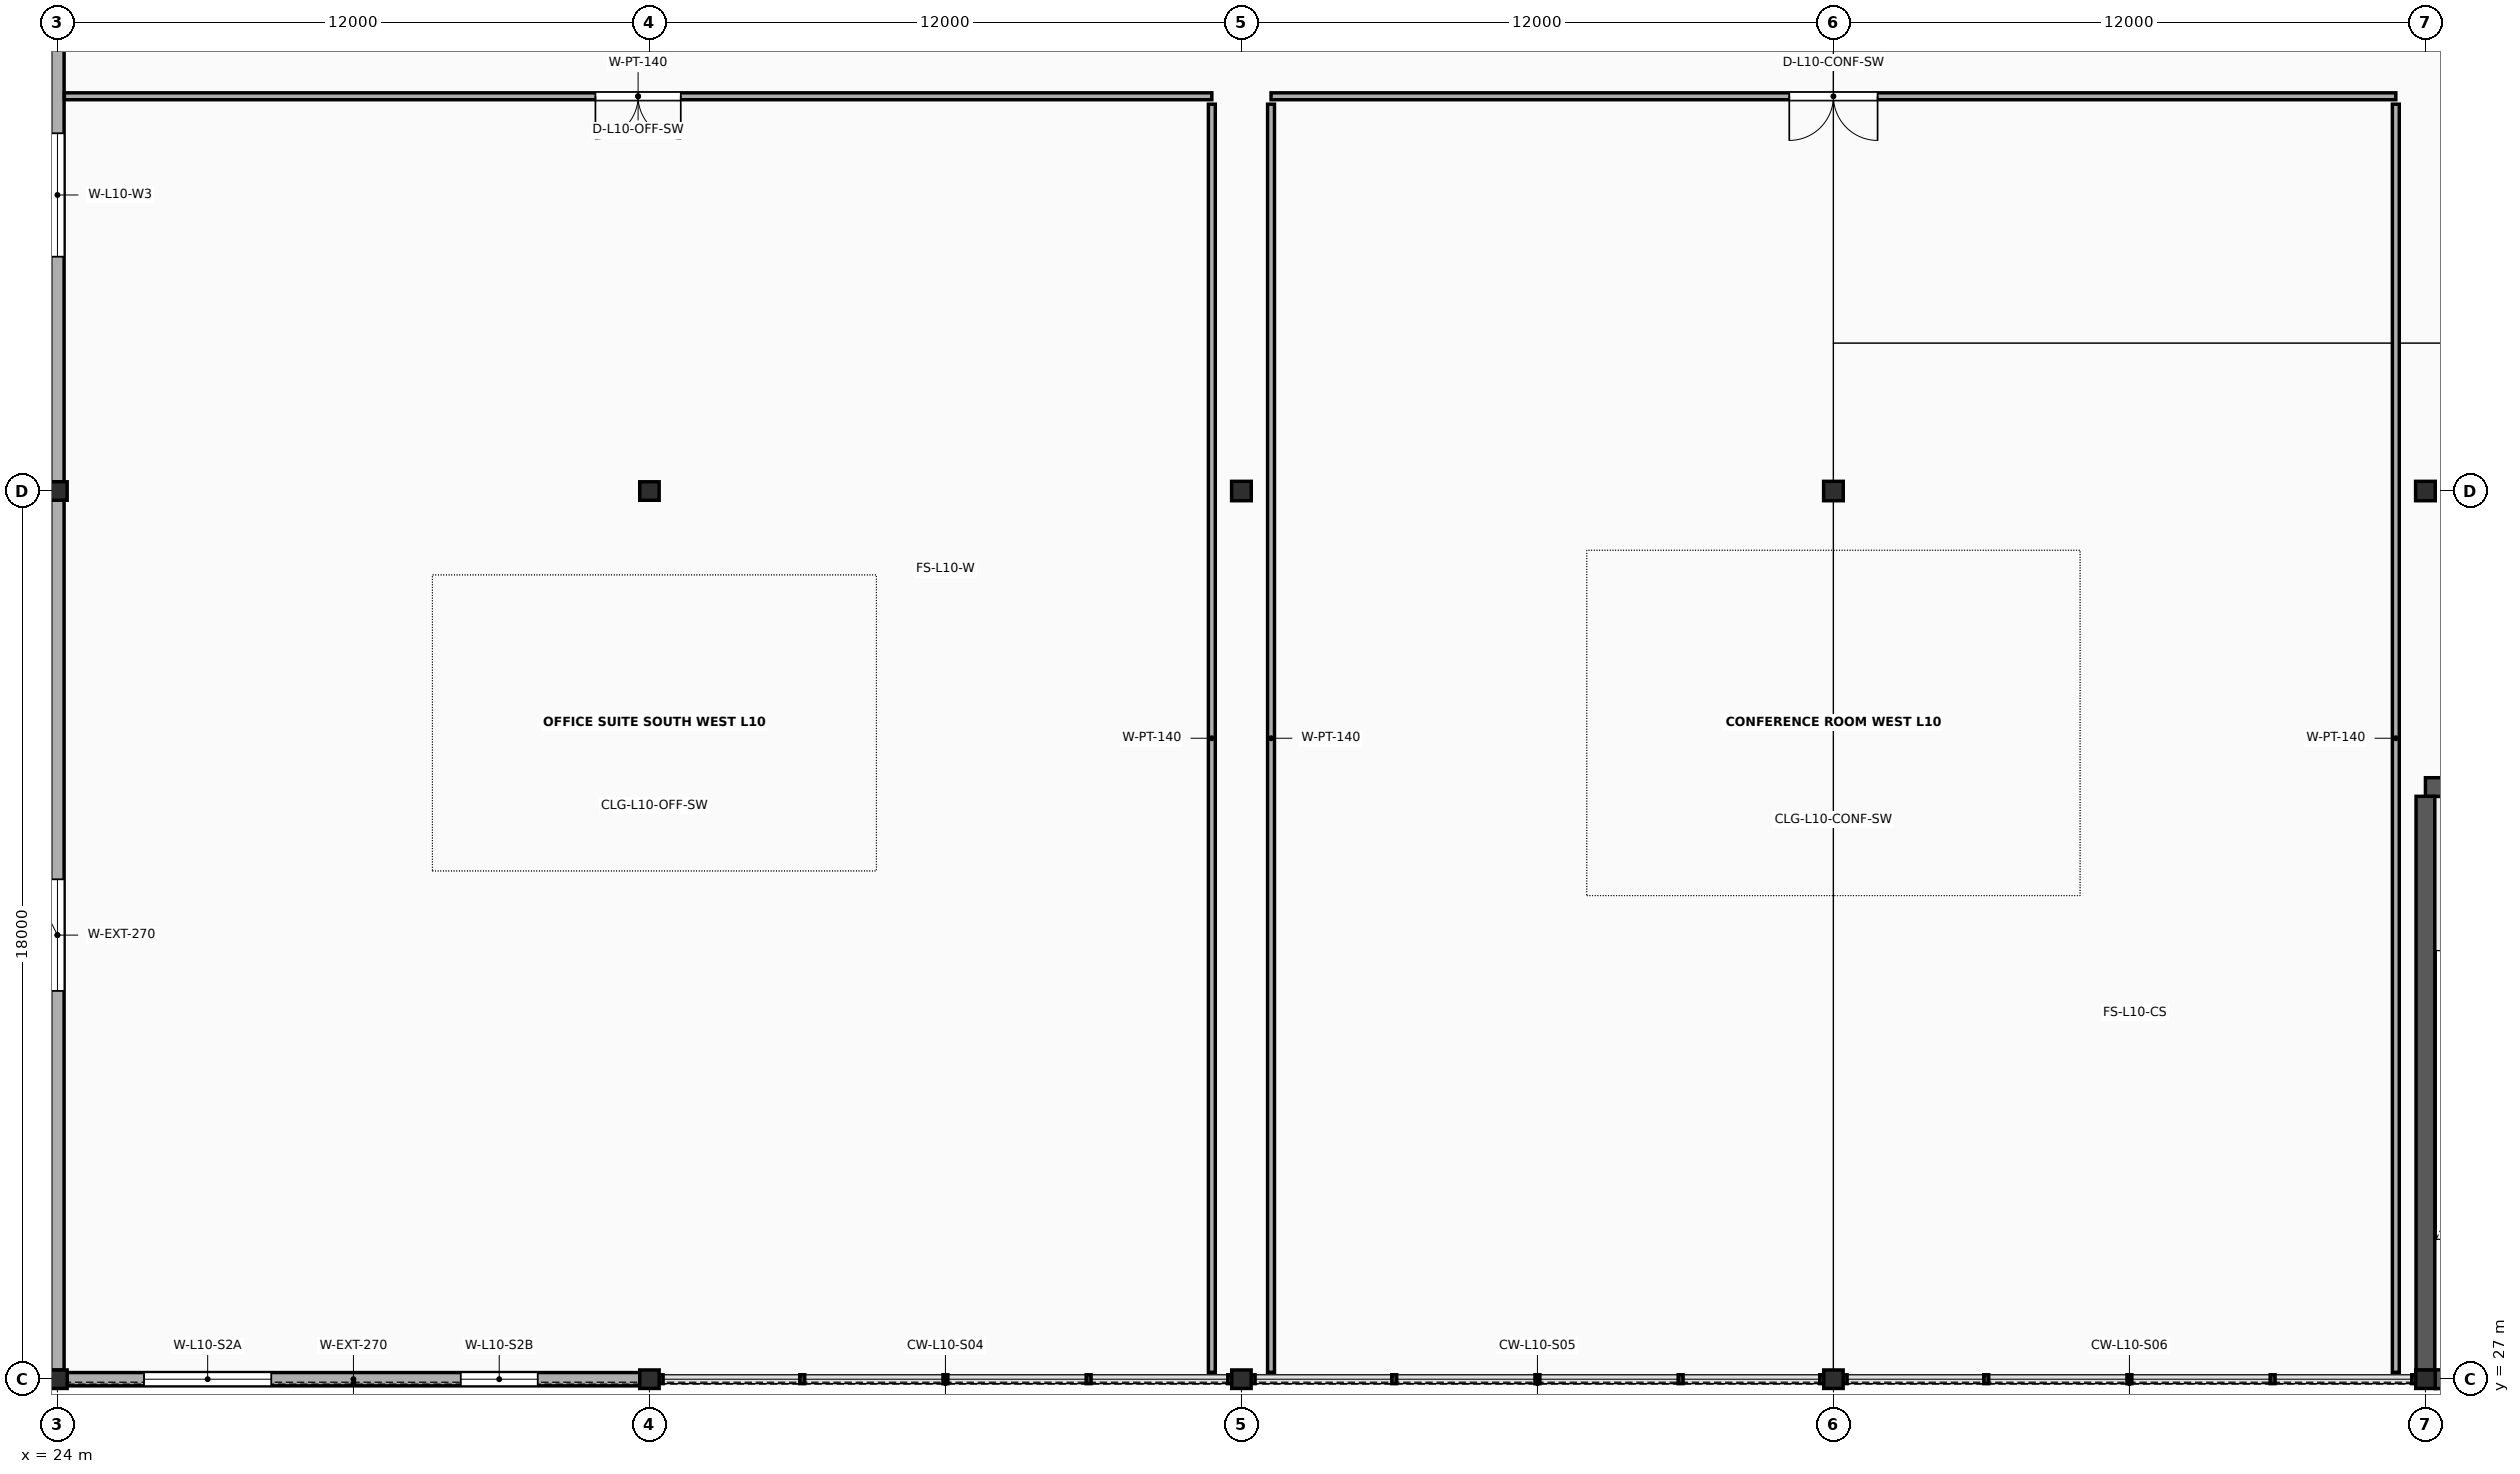
"""IFC4 building model, lengths in metres.
Left out: names, types, materials, properties, quantities, classifications, styles, units other than length and angle.
Written with IfcOpenShell. Run it as: python <this file> out.ifc"""

import sys

from ifc_helpers import new_model, si_unit, direction, frame, frame_2d, origin, origin_2d, place, context, subcontext, project, spatial, rectangle, i_section, extrude, element, fill, save


model = new_model("IFC4")
c1 = context("Model", 3, precision=1e-05, world=origin(), true_north=direction((0.0, 1.0)))
c2 = subcontext(c1, "Body", "Model", "MODEL_VIEW")
j1 = project(units=[si_unit("LENGTHUNIT", "METRE"), si_unit("PLANEANGLEUNIT", "RADIAN")], contexts=[c1])
p1 = place(None, origin())
s1 = spatial("IfcSite", under=j1, at=p1, CompositionType="ELEMENT")
p2 = place(p1, origin())
s2 = spatial("IfcBuilding", under=s1, at=p2, CompositionType="ELEMENT")
p3 = place(p2, frame((0.0, 0.0, 41.6)))
s3 = spatial("IfcBuildingStorey", under=s2, at=p3, CompositionType="ELEMENT", Elevation=41.6)
for number, where, z_axis, x_axis in (
    (1, (24.0, 27.0, 0.0), (0.0, 0.0, 1.0), (1.0, 0.0, 0.0)),
    (2, (24.0, 45.0, 0.0), (0.0, 0.0, 1.0), (1.0, 0.0, 0.0)),
    (3, (36.0, 27.0, 0.0), (0.0, 0.0, 1.0), (1.0, 0.0, 0.0)),
    (4, (36.0, 45.0, 0.0), (0.0, 0.0, 1.0), (1.0, 0.0, 0.0)),
    (5, (48.0, 27.0, 0.0), (0.0, 0.0, 1.0), (1.0, 0.0, 0.0)),
):
    element("IfcColumn", number, at=place(p3, frame(where, z_axis=z_axis, x_axis=x_axis)), inside=s3, PredefinedType="COLUMN", context=c2, shape_type="SweptSolid", body=[
        extrude(i_section(OverallWidth=0.394, OverallDepth=0.375, WebThickness=0.017, FlangeThickness=0.028, FilletRadius=0.018, at=origin_2d()), origin(), (0.0, 0.0, 1.0), 4.0),
    ])
p4 = place(p3, frame((48.0, 45.0, 0.0), z_axis=(0.0, 0.0, 1.0), x_axis=(1.0, 0.0, 0.0)))
e6 = element("IfcColumn", 6, at=p4, inside=s3, PredefinedType="COLUMN", context=c2, shape_type="SweptSolid", body=[
    extrude(i_section(OverallWidth=0.399, OverallDepth=0.393, WebThickness=0.023, FlangeThickness=0.037, FilletRadius=0.018, at=origin_2d()), origin(), (0.0, 0.0, 1.0), 4.0),
])
p5 = place(p3, frame((60.0, 27.0, 0.0), z_axis=(0.0, 0.0, 1.0), x_axis=(1.0, 0.0, 0.0)))
e7 = element("IfcColumn", 7, at=p5, inside=s3, PredefinedType="COLUMN", context=c2, shape_type="SweptSolid", body=[
    extrude(i_section(OverallWidth=0.394, OverallDepth=0.375, WebThickness=0.017, FlangeThickness=0.028, FilletRadius=0.018, at=origin_2d()), origin(), (0.0, 0.0, 1.0), 4.0),
])
p6 = place(p3, frame((60.0, 45.0, 0.0), z_axis=(0.0, 0.0, 1.0), x_axis=(1.0, 0.0, 0.0)))
e8 = element("IfcColumn", 8, at=p6, inside=s3, PredefinedType="COLUMN", context=c2, shape_type="SweptSolid", body=[
    extrude(i_section(OverallWidth=0.399, OverallDepth=0.393, WebThickness=0.023, FlangeThickness=0.037, FilletRadius=0.018, at=origin_2d()), origin(), (0.0, 0.0, 1.0), 4.0),
])
p7 = place(p3, frame((72.0, 27.0, 0.0), z_axis=(0.0, 0.0, 1.0), x_axis=(1.0, 0.0, 0.0)))
e9 = element("IfcColumn", 9, at=p7, inside=s3, PredefinedType="COLUMN", context=c2, shape_type="SweptSolid", body=[
    extrude(i_section(OverallWidth=0.394, OverallDepth=0.375, WebThickness=0.017, FlangeThickness=0.028, FilletRadius=0.018, at=origin_2d()), origin(), (0.0, 0.0, 1.0), 4.0),
])
p8 = place(p3, frame((72.0, 45.0, 0.0), z_axis=(0.0, 0.0, 1.0), x_axis=(1.0, 0.0, 0.0)))
e10 = element("IfcColumn", 10, at=p8, inside=s3, PredefinedType="COLUMN", context=c2, shape_type="SweptSolid", body=[
    extrude(i_section(OverallWidth=0.399, OverallDepth=0.393, WebThickness=0.023, FlangeThickness=0.037, FilletRadius=0.018, at=origin_2d()), origin(), (0.0, 0.0, 1.0), 4.0),
])
p9 = place(p3, frame((72.194, 27.0, 0.0), z_axis=(0.0, 0.0, 1.0), x_axis=(1.0, 0.0, 0.0)))
e11 = element("IfcWall", 11, at=p9, inside=s3, PredefinedType="SHEAR", context=c2, shape_type="SweptSolid", body=[
    extrude(rectangle(XDim=11.612, YDim=0.38, at=frame_2d((5.806, 0.0))), origin(), (0.0, 0.0, 1.0), 3.828),
])
p10 = place(p3, frame((72.0, 39.0, 0.0), z_axis=(0.0, 0.0, 1.0), x_axis=(1.0, 0.0, 0.0)))
e12 = element("IfcWall", 12, at=p10, inside=s3, PredefinedType="SHEAR", context=c2, shape_type="SweptSolid", body=[
    extrude(rectangle(XDim=12.0, YDim=0.38, at=frame_2d((6.0, 0.0))), origin(), (0.0, 0.0, 1.0), 3.828),
])
p11 = place(p10, frame((7.45, 0.0, 0.0)))
e13 = element("IfcOpeningElement", 13, at=p11, cuts=e12, PredefinedType="OPENING", context=c2, shape_type="SweptSolid", body=[
    extrude(rectangle(XDim=1.5, YDim=2.25, at=frame_2d((0.75, 1.125))), frame((0.0, 0.205, 0.0), z_axis=(0.0, -1.0, 0.0), x_axis=(1.0, 0.0, 0.0)), (0.0, 0.0, 1.0), 0.41),
])
p12 = place(p3, frame((72.0, 27.185, 0.0), z_axis=(0.0, 0.0, 1.0), x_axis=(0.0, 1.0, 0.0)))
e14 = element("IfcWall", 14, at=p12, inside=s3, PredefinedType="SHEAR", context=c2, shape_type="SweptSolid", body=[
    extrude(rectangle(XDim=11.628, YDim=0.38, at=frame_2d((5.814, 0.0))), origin(), (0.0, 0.0, 1.0), 3.828),
])
p13 = place(p3, frame((24.195, 27.0, 0.0), z_axis=(0.0, 0.0, 1.0), x_axis=(1.0, 0.0, 0.0)))
e15 = element("IfcWall", 15, at=p13, inside=s3, PredefinedType="SOLIDWALL", context=c2, shape_type="SweptSolid", body=[
    extrude(rectangle(XDim=11.61, YDim=0.27, at=frame_2d((5.805, 0.0))), origin(), (0.0, 0.0, 1.0), 3.281),
])
p14 = place(p13, frame((1.56, 0.0, 0.78)))
e16 = element("IfcOpeningElement", 16, at=p14, cuts=e15, PredefinedType="OPENING", context=c2, shape_type="SweptSolid", body=[
    extrude(rectangle(XDim=2.58, YDim=1.74, at=frame_2d((1.29, 0.87))), frame((0.0, 0.15, 0.0), z_axis=(0.0, -1.0, 0.0), x_axis=(1.0, 0.0, 0.0)), (0.0, 0.0, 1.0), 0.3),
])
p15 = place(p13, frame((7.98, 0.0, 0.78)))
e17 = element("IfcOpeningElement", 17, at=p15, cuts=e15, PredefinedType="OPENING", context=c2, shape_type="SweptSolid", body=[
    extrude(rectangle(XDim=1.56, YDim=1.9, at=frame_2d((0.78, 0.95))), frame((0.0, 0.15, 0.0), z_axis=(0.0, -1.0, 0.0), x_axis=(1.0, 0.0, 0.0)), (0.0, 0.0, 1.0), 0.3),
])
p16 = place(p3, frame((24.0, 27.186, 0.0), z_axis=(0.0, 0.0, 1.0), x_axis=(0.0, 1.0, 0.0)))
e18 = element("IfcWall", 18, at=p16, inside=s3, PredefinedType="SOLIDWALL", context=c2, shape_type="SweptSolid", body=[
    extrude(rectangle(XDim=17.629, YDim=0.27, at=frame_2d((8.814, 0.0))), origin(), (0.0, 0.0, 1.0), 3.281),
])
p17 = place(p16, frame((7.685, 0.0, 0.78)))
e19 = element("IfcOpeningElement", 19, at=p17, cuts=e18, PredefinedType="OPENING", context=c2, shape_type="SweptSolid", body=[
    extrude(rectangle(XDim=2.26, YDim=1.9, at=frame_2d((1.13, 0.95))), frame((0.0, 0.15, 0.0), z_axis=(0.0, -1.0, 0.0), x_axis=(1.0, 0.0, 0.0)), (0.0, 0.0, 1.0), 0.3),
])
p18 = place(p3, frame((24.0, 45.186, 0.0), z_axis=(0.0, 0.0, 1.0), x_axis=(0.0, 1.0, 0.0)))
e20 = element("IfcWall", 20, at=p18, inside=s3, PredefinedType="SOLIDWALL", context=c2, shape_type="SweptSolid", body=[
    extrude(rectangle(XDim=11.629, YDim=0.27, at=frame_2d((5.814, 0.0))), origin(), (0.0, 0.0, 1.0), 3.281),
])
p19 = place(p18, frame((4.564, 0.0, 0.78)))
e21 = element("IfcOpeningElement", 21, at=p19, cuts=e20, PredefinedType="OPENING", context=c2, shape_type="SweptSolid", body=[
    extrude(rectangle(XDim=2.5, YDim=1.9, at=frame_2d((1.25, 0.95))), frame((0.0, 0.15, 0.0), z_axis=(0.0, -1.0, 0.0), x_axis=(1.0, 0.0, 0.0)), (0.0, 0.0, 1.0), 0.3),
])
p20 = place(p3, frame((24.14, 53.0, 0.0), z_axis=(0.0, 0.0, 1.0), x_axis=(1.0, 0.0, 0.0)))
e22 = element("IfcWall", 22, at=p20, inside=s3, PredefinedType="PARTITIONING", context=c2, shape_type="SweptSolid", body=[
    extrude(rectangle(XDim=23.26, YDim=0.14, at=frame_2d((11.63, 0.0))), origin(), (0.0, 0.0, 1.0), 2.88),
])
p21 = place(p20, frame((10.765, 0.0, 0.0)))
e23 = element("IfcOpeningElement", 23, at=p21, cuts=e22, PredefinedType="OPENING", context=c2, shape_type="SweptSolid", body=[
    extrude(rectangle(XDim=1.73, YDim=2.37, at=frame_2d((0.865, 1.185))), frame((0.0, 0.085, 0.0), z_axis=(0.0, -1.0, 0.0), x_axis=(1.0, 0.0, 0.0)), (0.0, 0.0, 1.0), 0.17),
])
p22 = place(p3, frame((47.4, 27.14, 0.0), z_axis=(0.0, 0.0, 1.0), x_axis=(0.0, 1.0, 0.0)))
e24 = element("IfcWall", 24, at=p22, inside=s3, PredefinedType="PARTITIONING", context=c2, shape_type="SweptSolid", body=[
    extrude(rectangle(XDim=25.7, YDim=0.14, at=frame_2d((12.85, 0.0))), origin(), (0.0, 0.0, 1.0), 2.88),
])
p23 = place(p3, frame((48.6, 53.0, 0.0), z_axis=(0.0, 0.0, 1.0), x_axis=(1.0, 0.0, 0.0)))
e25 = element("IfcWall", 25, at=p23, inside=s3, PredefinedType="PARTITIONING", context=c2, shape_type="SweptSolid", body=[
    extrude(rectangle(XDim=22.8, YDim=0.14, at=frame_2d((11.4, 0.0))), origin(), (0.0, 0.0, 1.0), 2.88),
])
p24 = place(p23, frame((10.505, 0.0, 0.0)))
e26 = element("IfcOpeningElement", 26, at=p24, cuts=e25, PredefinedType="OPENING", context=c2, shape_type="SweptSolid", body=[
    extrude(rectangle(XDim=1.79, YDim=2.39, at=frame_2d((0.895, 1.195))), frame((0.0, 0.085, 0.0), z_axis=(0.0, -1.0, 0.0), x_axis=(1.0, 0.0, 0.0)), (0.0, 0.0, 1.0), 0.17),
])
for number, where, z_axis, x_axis in (
    (27, (48.6, 27.14, 0.0), (0.0, 0.0, 1.0), (0.0, 1.0, 0.0)),
    (28, (71.4, 27.14, 0.0), (0.0, 0.0, 1.0), (0.0, 1.0, 0.0)),
):
    element("IfcWall", number, at=place(p3, frame(where, z_axis=z_axis, x_axis=x_axis)), inside=s3, PredefinedType="PARTITIONING", context=c2, shape_type="SweptSolid", body=[
        extrude(rectangle(XDim=25.7, YDim=0.14, at=frame_2d((12.85, 0.0))), origin(), (0.0, 0.0, 1.0), 2.88),
    ])
p25 = place(p14, origin())
e29 = element("IfcWindow", 29, at=p25, inside=s3, PartitioningType="DOUBLE_PANEL_VERTICAL", PredefinedType="WINDOW", context=c2, shape_type="SweptSolid", body=[
    extrude(rectangle(XDim=2.58, YDim=1.74, at=frame_2d((1.29, 0.87))), frame((0.0, 0.03, 0.0), z_axis=(0.0, -1.0, 0.0), x_axis=(1.0, 0.0, 0.0)), (0.0, 0.0, 1.0), 0.06),
])
fill(e16, e29)
p26 = place(p15, origin())
e30 = element("IfcWindow", 30, at=p26, inside=s3, PartitioningType="SINGLE_PANEL", PredefinedType="WINDOW", context=c2, shape_type="SweptSolid", body=[
    extrude(rectangle(XDim=1.56, YDim=1.9, at=frame_2d((0.78, 0.95))), frame((0.0, 0.03, 0.0), z_axis=(0.0, -1.0, 0.0), x_axis=(1.0, 0.0, 0.0)), (0.0, 0.0, 1.0), 0.06),
])
fill(e17, e30)
p27 = place(p17, origin())
e31 = element("IfcWindow", 31, at=p27, inside=s3, PartitioningType="DOUBLE_PANEL_VERTICAL", PredefinedType="WINDOW", context=c2, shape_type="SweptSolid", body=[
    extrude(rectangle(XDim=2.26, YDim=1.9, at=frame_2d((1.13, 0.95))), frame((0.0, 0.03, 0.0), z_axis=(0.0, -1.0, 0.0), x_axis=(1.0, 0.0, 0.0)), (0.0, 0.0, 1.0), 0.06),
])
fill(e19, e31)
p28 = place(p19, origin())
e32 = element("IfcWindow", 32, at=p28, inside=s3, PartitioningType="DOUBLE_PANEL_VERTICAL", PredefinedType="WINDOW", context=c2, shape_type="SweptSolid", body=[
    extrude(rectangle(XDim=2.5, YDim=1.9, at=frame_2d((1.25, 0.95))), frame((0.0, 0.03, 0.0), z_axis=(0.0, -1.0, 0.0), x_axis=(1.0, 0.0, 0.0)), (0.0, 0.0, 1.0), 0.06),
])
fill(e21, e32)
p29 = place(p21, origin())
e33 = element("IfcDoor", 33, at=p29, inside=s3, OperationType="DOUBLE_DOOR_SINGLE_SWING", PredefinedType="DOOR", context=c2, shape_type="SweptSolid", body=[
    extrude(rectangle(XDim=1.73, YDim=2.37, at=frame_2d((0.865, 1.185))), frame((0.0, 0.025, 0.0), z_axis=(0.0, -1.0, 0.0), x_axis=(1.0, 0.0, 0.0)), (0.0, 0.0, 1.0), 0.05),
])
fill(e23, e33)
p30 = place(p24, origin())
e34 = element("IfcDoor", 34, at=p30, inside=s3, OperationType="DOUBLE_DOOR_SINGLE_SWING", PredefinedType="DOOR", context=c2, shape_type="SweptSolid", body=[
    extrude(rectangle(XDim=1.79, YDim=2.39, at=frame_2d((0.895, 1.195))), frame((0.0, 0.025, 0.0), z_axis=(0.0, -1.0, 0.0), x_axis=(1.0, 0.0, 0.0)), (0.0, 0.0, 1.0), 0.05),
])
fill(e26, e34)
save(model, sys.argv[1])
